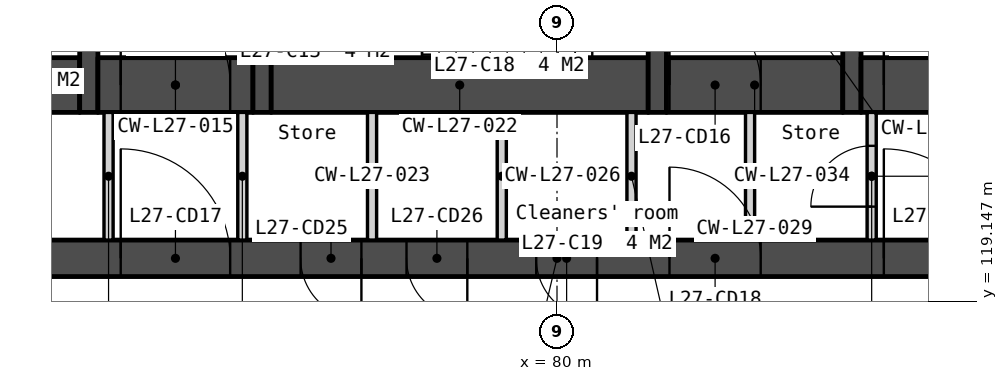
"""IFC4 building model, lengths in metres.
Left out: names, types, materials, properties, quantities, classifications, styles, units other than length and angle.
Written with IfcOpenShell. Run it as: python <this file> out.ifc"""

import sys

from ifc_helpers import new_model, si_unit, direction, frame, frame_2d, origin, place, context, subcontext, project, spatial, polyline, rectangle, outline, extrude, element, fill, save


model = new_model("IFC4")
c1 = context("Model", 3, precision=1e-05, world=origin(), true_north=direction((0.0, 1.0)))
c2 = subcontext(c1, "Body", "Model", "MODEL_VIEW")
j1 = project(units=[si_unit("LENGTHUNIT", "METRE"), si_unit("PLANEANGLEUNIT", "RADIAN")], contexts=[c1])
p1 = place(None, origin())
s1 = spatial("IfcSite", under=j1, at=p1, CompositionType="ELEMENT")
p2 = place(p1, origin())
s2 = spatial("IfcBuilding", under=s1, at=p2, CompositionType="ELEMENT")
p3 = place(p2, frame((0.0, 0.0, 109.8)))
s3 = spatial("IfcBuildingStorey", under=s2, at=p3, CompositionType="ELEMENT", Elevation=109.8)
p4 = place(p3, frame((66.0, 119.85, 0.0), z_axis=(0.0, 0.0, 1.0), x_axis=(1.0, 0.0, 0.0)))
e1 = element("IfcWall", 1, at=p4, inside=s3, PredefinedType="SOLIDWALL", context=c2, shape_type="SweptSolid", body=[
    extrude(rectangle(XDim=28.0, YDim=0.6, at=frame_2d((14.0, 0.0))), origin(), (0.0, 0.0, 1.0), 3.35),
])
p5 = place(p4, frame((6.825, 0.0, 0.0)))
e2 = element("IfcOpeningElement", 2, at=p5, cuts=e1, PredefinedType="OPENING", context=c2, shape_type="SweptSolid", body=[
    extrude(rectangle(XDim=1.8, YDim=2.1, at=frame_2d((0.9, 1.05))), frame((0.0, 0.31, 0.0), z_axis=(0.0, -1.0, 0.0), x_axis=(1.0, 0.0, 0.0)), (0.0, 0.0, 1.0), 0.62),
])
p6 = place(p4, frame((15.85, 0.0, 0.0)))
e3 = element("IfcOpeningElement", 3, at=p6, cuts=e1, PredefinedType="OPENING", context=c2, shape_type="SweptSolid", body=[
    extrude(rectangle(XDim=1.5, YDim=2.1, at=frame_2d((0.75, 1.05))), frame((0.0, 0.31, 0.0), z_axis=(0.0, -1.0, 0.0), x_axis=(1.0, 0.0, 0.0)), (0.0, 0.0, 1.0), 0.62),
])
p7 = place(p4, frame((19.375, 0.0, 0.0)))
e4 = element("IfcOpeningElement", 4, at=p7, cuts=e1, PredefinedType="OPENING", context=c2, shape_type="SweptSolid", body=[
    extrude(rectangle(XDim=1.8, YDim=2.1, at=frame_2d((0.9, 1.05))), frame((0.0, 0.31, 0.0), z_axis=(0.0, -1.0, 0.0), x_axis=(1.0, 0.0, 0.0)), (0.0, 0.0, 1.0), 0.62),
])
p8 = place(p4, frame((4.425, 0.0, 0.0)))
e5 = element("IfcOpeningElement", 5, at=p8, cuts=e1, PredefinedType="OPENING", context=c2, shape_type="SweptSolid", body=[
    extrude(rectangle(XDim=1.0, YDim=2.1, at=frame_2d((0.5, 1.05))), frame((0.0, 0.31, 0.0), z_axis=(0.0, -1.0, 0.0), x_axis=(1.0, 0.0, 0.0)), (0.0, 0.0, 1.0), 0.62),
])
p9 = place(p4, frame((9.783, 0.0, 0.0)))
e6 = element("IfcOpeningElement", 6, at=p9, cuts=e1, PredefinedType="OPENING", context=c2, shape_type="SweptSolid", body=[
    extrude(rectangle(XDim=1.0, YDim=2.1, at=frame_2d((0.5, 1.05))), frame((0.0, 0.31, 0.0), z_axis=(0.0, -1.0, 0.0), x_axis=(1.0, 0.0, 0.0)), (0.0, 0.0, 1.0), 0.62),
])
p10 = place(p4, frame((11.525, 0.0, 0.0)))
e7 = element("IfcOpeningElement", 7, at=p10, cuts=e1, PredefinedType="OPENING", context=c2, shape_type="SweptSolid", body=[
    extrude(rectangle(XDim=1.0, YDim=2.1, at=frame_2d((0.5, 1.05))), frame((0.0, 0.31, 0.0), z_axis=(0.0, -1.0, 0.0), x_axis=(1.0, 0.0, 0.0)), (0.0, 0.0, 1.0), 0.62),
])
p11 = place(p4, frame((13.658, 0.0, 0.0)))
e8 = element("IfcOpeningElement", 8, at=p11, cuts=e1, PredefinedType="OPENING", context=c2, shape_type="SweptSolid", body=[
    extrude(rectangle(XDim=1.0, YDim=2.1, at=frame_2d((0.5, 1.05))), frame((0.0, 0.31, 0.0), z_axis=(0.0, -1.0, 0.0), x_axis=(1.0, 0.0, 0.0)), (0.0, 0.0, 1.0), 0.62),
])
p12 = place(p4, frame((22.575, 0.0, 0.0)))
e9 = element("IfcOpeningElement", 9, at=p12, cuts=e1, PredefinedType="OPENING", context=c2, shape_type="SweptSolid", body=[
    extrude(rectangle(XDim=1.0, YDim=2.1, at=frame_2d((0.5, 1.05))), frame((0.0, 0.31, 0.0), z_axis=(0.0, -1.0, 0.0), x_axis=(1.0, 0.0, 0.0)), (0.0, 0.0, 1.0), 0.62),
])
p13 = place(p3, frame((69.6, 122.7, 0.0), z_axis=(0.0, 0.0, 1.0), x_axis=(1.0, 0.0, 0.0)))
e10 = element("IfcWall", 10, at=p13, inside=s3, PredefinedType="SOLIDWALL", context=c2, shape_type="SweptSolid", body=[
    extrude(rectangle(XDim=2.55, YDim=0.9, at=frame_2d((1.275, 0.0))), origin(), (0.0, 0.0, 1.0), 3.35),
])
p14 = place(p3, frame((72.3, 133.95, 0.0), z_axis=(0.0, 0.0, 1.0), x_axis=(0.0, -1.0, 0.0)))
e11 = element("IfcWall", 11, at=p14, inside=s3, PredefinedType="SOLIDWALL", context=c2, shape_type="SweptSolid", body=[
    extrude(rectangle(XDim=11.7, YDim=0.3, at=frame_2d((5.85, 0.0))), origin(), (0.0, 0.0, 1.0), 3.35),
])
p15 = place(p14, frame((6.95, 0.0, 0.0)))
e12 = element("IfcOpeningElement", 12, at=p15, cuts=e11, PredefinedType="OPENING", context=c2, shape_type="SweptSolid", body=[
    extrude(rectangle(XDim=1.1, YDim=2.1, at=frame_2d((0.55, 1.05))), frame((0.0, 0.16, 0.0), z_axis=(0.0, -1.0, 0.0), x_axis=(1.0, 0.0, 0.0)), (0.0, 0.0, 1.0), 0.32),
])
p16 = place(p14, frame((9.35, 0.0, 0.0)))
e13 = element("IfcOpeningElement", 13, at=p16, cuts=e11, PredefinedType="OPENING", context=c2, shape_type="SweptSolid", body=[
    extrude(rectangle(XDim=0.9, YDim=2.1, at=frame_2d((0.45, 1.05))), frame((0.0, 0.16, 0.0), z_axis=(0.0, -1.0, 0.0), x_axis=(1.0, 0.0, 0.0)), (0.0, 0.0, 1.0), 0.32),
])
p17 = place(p14, frame((5.1, 0.0, 0.0)))
e14 = element("IfcOpeningElement", 14, at=p17, cuts=e11, PredefinedType="OPENING", context=c2, shape_type="SweptSolid", body=[
    extrude(rectangle(XDim=1.0, YDim=2.1, at=frame_2d((0.5, 1.05))), frame((0.0, 0.16, 0.0), z_axis=(0.0, -1.0, 0.0), x_axis=(1.0, 0.0, 0.0)), (0.0, 0.0, 1.0), 0.32),
])
p18 = place(p3, frame((72.45, 122.7, 0.0), z_axis=(0.0, 0.0, 1.0), x_axis=(1.0, 0.0, 0.0)))
e15 = element("IfcWall", 15, at=p18, inside=s3, PredefinedType="SOLIDWALL", context=c2, shape_type="SweptSolid", body=[
    extrude(rectangle(XDim=2.55, YDim=0.9, at=frame_2d((1.275, 0.0))), origin(), (0.0, 0.0, 1.0), 3.35),
])
p19 = place(p18, frame((0.375, 0.0, 0.0)))
e16 = element("IfcOpeningElement", 16, at=p19, cuts=e15, PredefinedType="OPENING", context=c2, shape_type="SweptSolid", body=[
    extrude(rectangle(XDim=1.8, YDim=2.1, at=frame_2d((0.9, 1.05))), frame((0.0, 0.46, 0.0), z_axis=(0.0, -1.0, 0.0), x_axis=(1.0, 0.0, 0.0)), (0.0, 0.0, 1.0), 0.92),
])
for number, where, z_axis, x_axis in (
    (17, (72.625, 122.25, 0.0), (0.0, 0.0, 1.0), (0.0, -1.0, 0.0)),
    (18, (74.825, 122.25, 0.0), (0.0, 0.0, 1.0), (0.0, -1.0, 0.0)),
):
    element("IfcWall", number, at=place(p3, frame(where, z_axis=z_axis, x_axis=x_axis)), inside=s3, PredefinedType="PARTITIONING", context=c2, shape_type="SweptSolid", body=[
        extrude(rectangle(XDim=2.1, YDim=0.15, at=frame_2d((1.05, 0.0))), origin(), (0.0, 0.0, 1.0), 3.35),
    ])
p20 = place(p3, frame((75.15, 133.95, 0.0), z_axis=(0.0, 0.0, 1.0), x_axis=(0.0, -1.0, 0.0)))
e19 = element("IfcWall", 19, at=p20, inside=s3, PredefinedType="SOLIDWALL", context=c2, shape_type="SweptSolid", body=[
    extrude(rectangle(XDim=11.7, YDim=0.3, at=frame_2d((5.85, 0.0))), origin(), (0.0, 0.0, 1.0), 3.35),
])
p21 = place(p3, frame((75.3, 122.7, 0.0), z_axis=(0.0, 0.0, 1.0), x_axis=(1.0, 0.0, 0.0)))
e20 = element("IfcWall", 20, at=p21, inside=s3, PredefinedType="SOLIDWALL", context=c2, shape_type="SweptSolid", body=[
    extrude(rectangle(XDim=6.2, YDim=0.9, at=frame_2d((3.1, 0.0))), origin(), (0.0, 0.0, 1.0), 3.35),
])
for number, where, z_axis, x_axis in (
    (21, (76.958, 122.25, 0.0), (0.0, 0.0, 1.0), (0.0, -1.0, 0.0)),
    (22, (79.092, 122.25, 0.0), (0.0, 0.0, 1.0), (0.0, -1.0, 0.0)),
    (23, (81.225, 122.25, 0.0), (0.0, 0.0, 1.0), (0.0, -1.0, 0.0)),
):
    element("IfcWall", number, at=place(p3, frame(where, z_axis=z_axis, x_axis=x_axis)), inside=s3, PredefinedType="PARTITIONING", context=c2, shape_type="SweptSolid", body=[
        extrude(rectangle(XDim=2.1, YDim=0.15, at=frame_2d((1.05, 0.0))), origin(), (0.0, 0.0, 1.0), 3.35),
    ])
p22 = place(p3, frame((81.65, 125.7, 0.0), z_axis=(0.0, 0.0, 1.0), x_axis=(0.0, -1.0, 0.0)))
e24 = element("IfcWall", 24, at=p22, inside=s3, PredefinedType="SOLIDWALL", context=c2, shape_type="SweptSolid", body=[
    extrude(rectangle(XDim=3.45, YDim=0.3, at=frame_2d((1.725, 0.0))), origin(), (0.0, 0.0, 1.0), 3.35),
])
p23 = place(p22, frame((0.75, 0.0, 0.0)))
e25 = element("IfcOpeningElement", 25, at=p23, cuts=e24, PredefinedType="OPENING", context=c2, shape_type="SweptSolid", body=[
    extrude(rectangle(XDim=1.0, YDim=2.1, at=frame_2d((0.5, 1.05))), frame((0.0, 0.16, 0.0), z_axis=(0.0, -1.0, 0.0), x_axis=(1.0, 0.0, 0.0)), (0.0, 0.0, 1.0), 0.32),
])
p24 = place(p3, frame((81.8, 122.7, 0.0), z_axis=(0.0, 0.0, 1.0), x_axis=(1.0, 0.0, 0.0)))
e26 = element("IfcWall", 26, at=p24, inside=s3, PredefinedType="SOLIDWALL", context=c2, shape_type="SweptSolid", body=[
    extrude(rectangle(XDim=2.9, YDim=0.9, at=frame_2d((1.45, 0.0))), origin(), (0.0, 0.0, 1.0), 3.35),
])
p25 = place(p24, frame((0.05, 0.0, 0.0)))
e27 = element("IfcOpeningElement", 27, at=p25, cuts=e26, PredefinedType="OPENING", context=c2, shape_type="SweptSolid", body=[
    extrude(rectangle(XDim=1.5, YDim=2.1, at=frame_2d((0.75, 1.05))), frame((0.0, 0.46, 0.0), z_axis=(0.0, -1.0, 0.0), x_axis=(1.0, 0.0, 0.0)), (0.0, 0.0, 1.0), 0.92),
])
p26 = place(p3, frame((83.175, 122.25, 0.0), z_axis=(0.0, 0.0, 1.0), x_axis=(0.0, -1.0, 0.0)))
e28 = element("IfcWall", 28, at=p26, inside=s3, PredefinedType="PARTITIONING", context=c2, shape_type="SweptSolid", body=[
    extrude(rectangle(XDim=2.1, YDim=0.15, at=frame_2d((1.05, 0.0))), origin(), (0.0, 0.0, 1.0), 3.35),
])
p27 = place(p3, frame((84.85, 133.95, 0.0), z_axis=(0.0, 0.0, 1.0), x_axis=(0.0, -1.0, 0.0)))
e29 = element("IfcWall", 29, at=p27, inside=s3, PredefinedType="SOLIDWALL", context=c2, shape_type="SweptSolid", body=[
    extrude(rectangle(XDim=11.7, YDim=0.3, at=frame_2d((5.85, 0.0))), origin(), (0.0, 0.0, 1.0), 3.35),
])
p28 = place(p3, frame((85.0, 122.7, 0.0), z_axis=(0.0, 0.0, 1.0), x_axis=(1.0, 0.0, 0.0)))
e30 = element("IfcWall", 30, at=p28, inside=s3, PredefinedType="SOLIDWALL", context=c2, shape_type="SweptSolid", body=[
    extrude(rectangle(XDim=2.55, YDim=0.9, at=frame_2d((1.275, 0.0))), origin(), (0.0, 0.0, 1.0), 3.35),
])
p29 = place(p28, frame((0.375, 0.0, 0.0)))
e31 = element("IfcOpeningElement", 31, at=p29, cuts=e30, PredefinedType="OPENING", context=c2, shape_type="SweptSolid", body=[
    extrude(rectangle(XDim=1.8, YDim=2.1, at=frame_2d((0.9, 1.05))), frame((0.0, 0.46, 0.0), z_axis=(0.0, -1.0, 0.0), x_axis=(1.0, 0.0, 0.0)), (0.0, 0.0, 1.0), 0.92),
])
p30 = place(p3, frame((85.175, 122.25, 0.0), z_axis=(0.0, 0.0, 1.0), x_axis=(0.0, -1.0, 0.0)))
e32 = element("IfcWall", 32, at=p30, inside=s3, PredefinedType="PARTITIONING", context=c2, shape_type="SweptSolid", body=[
    extrude(rectangle(XDim=2.1, YDim=0.15, at=frame_2d((1.05, 0.0))), origin(), (0.0, 0.0, 1.0), 3.35),
])
p31 = place(p30, frame((0.55, 0.0, 0.0)))
e33 = element("IfcOpeningElement", 33, at=p31, cuts=e32, PredefinedType="OPENING", context=c2, shape_type="SweptSolid", body=[
    extrude(rectangle(XDim=1.0, YDim=2.1, at=frame_2d((0.5, 1.05))), frame((0.0, 0.085, 0.0), z_axis=(0.0, -1.0, 0.0), x_axis=(1.0, 0.0, 0.0)), (0.0, 0.0, 1.0), 0.17),
])
p32 = place(p3, frame((56.073, 130.263, -0.15), z_axis=(0.0, 0.0, 1.0), x_axis=(0.500000478905, -0.866025127289, 0.0)))
e34 = element("IfcWall", 34, at=p32, inside=s3, PredefinedType="SOLIDWALL", context=c2, shape_type="SweptSolid", body=[
    extrude(outline(polyline([(42.643, 0.0), (42.643, 3.5), (0.0, 3.5), (0.0, 0.0), (42.643, 0.0)])), frame((0.0, 0.225, 0.0), z_axis=(0.0, -1.0, 0.0), x_axis=(1.0, 0.0, 0.0)), (0.0, 0.0, 1.0), 0.45),
])
p33 = place(p32, frame((2.814, 0.0, 1.05)))
e35 = element("IfcOpeningElement", 35, at=p33, cuts=e34, PredefinedType="OPENING", context=c2, shape_type="SweptSolid", body=[
    extrude(rectangle(XDim=1.2, YDim=1.5, at=frame_2d((0.6, 0.75))), frame((0.0, 0.235, 0.0), z_axis=(0.0, -1.0, 0.0), x_axis=(1.0, 0.0, 0.0)), (0.0, 0.0, 1.0), 0.47),
])
p34 = place(p32, frame((4.514, 0.0, 1.05)))
e36 = element("IfcOpeningElement", 36, at=p34, cuts=e34, PredefinedType="OPENING", context=c2, shape_type="SweptSolid", body=[
    extrude(rectangle(XDim=1.2, YDim=1.5, at=frame_2d((0.6, 0.75))), frame((0.0, 0.235, 0.0), z_axis=(0.0, -1.0, 0.0), x_axis=(1.0, 0.0, 0.0)), (0.0, 0.0, 1.0), 0.47),
])
p35 = place(p32, frame((11.343, 0.0, 1.05)))
e37 = element("IfcOpeningElement", 37, at=p35, cuts=e34, PredefinedType="OPENING", context=c2, shape_type="SweptSolid", body=[
    extrude(rectangle(XDim=1.2, YDim=1.5, at=frame_2d((0.6, 0.75))), frame((0.0, 0.235, 0.0), z_axis=(0.0, -1.0, 0.0), x_axis=(1.0, 0.0, 0.0)), (0.0, 0.0, 1.0), 0.47),
])
p36 = place(p32, frame((13.043, 0.0, 1.05)))
e38 = element("IfcOpeningElement", 38, at=p36, cuts=e34, PredefinedType="OPENING", context=c2, shape_type="SweptSolid", body=[
    extrude(rectangle(XDim=1.2, YDim=1.5, at=frame_2d((0.6, 0.75))), frame((0.0, 0.235, 0.0), z_axis=(0.0, -1.0, 0.0), x_axis=(1.0, 0.0, 0.0)), (0.0, 0.0, 1.0), 0.47),
])
p37 = place(p32, frame((19.872, 0.0, 1.05)))
e39 = element("IfcOpeningElement", 39, at=p37, cuts=e34, PredefinedType="OPENING", context=c2, shape_type="SweptSolid", body=[
    extrude(rectangle(XDim=1.2, YDim=1.5, at=frame_2d((0.6, 0.75))), frame((0.0, 0.235, 0.0), z_axis=(0.0, -1.0, 0.0), x_axis=(1.0, 0.0, 0.0)), (0.0, 0.0, 1.0), 0.47),
])
p38 = place(p32, frame((21.572, 0.0, 1.05)))
e40 = element("IfcOpeningElement", 40, at=p38, cuts=e34, PredefinedType="OPENING", context=c2, shape_type="SweptSolid", body=[
    extrude(rectangle(XDim=1.2, YDim=1.5, at=frame_2d((0.6, 0.75))), frame((0.0, 0.235, 0.0), z_axis=(0.0, -1.0, 0.0), x_axis=(1.0, 0.0, 0.0)), (0.0, 0.0, 1.0), 0.47),
])
p39 = place(p32, frame((28.4, 0.0, 1.05)))
e41 = element("IfcOpeningElement", 41, at=p39, cuts=e34, PredefinedType="OPENING", context=c2, shape_type="SweptSolid", body=[
    extrude(rectangle(XDim=1.2, YDim=1.5, at=frame_2d((0.6, 0.75))), frame((0.0, 0.235, 0.0), z_axis=(0.0, -1.0, 0.0), x_axis=(1.0, 0.0, 0.0)), (0.0, 0.0, 1.0), 0.47),
])
p40 = place(p32, frame((30.1, 0.0, 1.05)))
e42 = element("IfcOpeningElement", 42, at=p40, cuts=e34, PredefinedType="OPENING", context=c2, shape_type="SweptSolid", body=[
    extrude(rectangle(XDim=1.2, YDim=1.5, at=frame_2d((0.6, 0.75))), frame((0.0, 0.235, 0.0), z_axis=(0.0, -1.0, 0.0), x_axis=(1.0, 0.0, 0.0)), (0.0, 0.0, 1.0), 0.47),
])
p41 = place(p32, frame((36.929, 0.0, 1.05)))
e43 = element("IfcOpeningElement", 43, at=p41, cuts=e34, PredefinedType="OPENING", context=c2, shape_type="SweptSolid", body=[
    extrude(rectangle(XDim=1.2, YDim=1.5, at=frame_2d((0.6, 0.75))), frame((0.0, 0.235, 0.0), z_axis=(0.0, -1.0, 0.0), x_axis=(1.0, 0.0, 0.0)), (0.0, 0.0, 1.0), 0.47),
])
p42 = place(p32, frame((38.629, 0.0, 1.05)))
e44 = element("IfcOpeningElement", 44, at=p42, cuts=e34, PredefinedType="OPENING", context=c2, shape_type="SweptSolid", body=[
    extrude(rectangle(XDim=1.2, YDim=1.5, at=frame_2d((0.6, 0.75))), frame((0.0, 0.235, 0.0), z_axis=(0.0, -1.0, 0.0), x_axis=(1.0, 0.0, 0.0)), (0.0, 0.0, 1.0), 0.47),
])
p43 = place(p3, frame((82.605, 93.333, -0.15), z_axis=(0.0, 0.0, 1.0), x_axis=(0.500000478905, 0.866025127289, 0.0)))
e45 = element("IfcWall", 45, at=p43, inside=s3, PredefinedType="SOLIDWALL", context=c2, shape_type="SweptSolid", body=[
    extrude(outline(polyline([(42.643, 0.0), (42.643, 3.5), (0.0, 3.5), (0.0, 0.0), (42.643, 0.0)])), frame((0.0, 0.225, 0.0), z_axis=(0.0, -1.0, 0.0), x_axis=(1.0, 0.0, 0.0)), (0.0, 0.0, 1.0), 0.45),
])
p44 = place(p43, frame((2.814, 0.0, 1.05)))
e46 = element("IfcOpeningElement", 46, at=p44, cuts=e45, PredefinedType="OPENING", context=c2, shape_type="SweptSolid", body=[
    extrude(rectangle(XDim=1.2, YDim=1.5, at=frame_2d((0.6, 0.75))), frame((0.0, 0.235, 0.0), z_axis=(0.0, -1.0, 0.0), x_axis=(1.0, 0.0, 0.0)), (0.0, 0.0, 1.0), 0.47),
])
p45 = place(p43, frame((4.514, 0.0, 1.05)))
e47 = element("IfcOpeningElement", 47, at=p45, cuts=e45, PredefinedType="OPENING", context=c2, shape_type="SweptSolid", body=[
    extrude(rectangle(XDim=1.2, YDim=1.5, at=frame_2d((0.6, 0.75))), frame((0.0, 0.235, 0.0), z_axis=(0.0, -1.0, 0.0), x_axis=(1.0, 0.0, 0.0)), (0.0, 0.0, 1.0), 0.47),
])
p46 = place(p43, frame((11.343, 0.0, 1.05)))
e48 = element("IfcOpeningElement", 48, at=p46, cuts=e45, PredefinedType="OPENING", context=c2, shape_type="SweptSolid", body=[
    extrude(rectangle(XDim=1.2, YDim=1.5, at=frame_2d((0.6, 0.75))), frame((0.0, 0.235, 0.0), z_axis=(0.0, -1.0, 0.0), x_axis=(1.0, 0.0, 0.0)), (0.0, 0.0, 1.0), 0.47),
])
p47 = place(p43, frame((13.043, 0.0, 1.05)))
e49 = element("IfcOpeningElement", 49, at=p47, cuts=e45, PredefinedType="OPENING", context=c2, shape_type="SweptSolid", body=[
    extrude(rectangle(XDim=1.2, YDim=1.5, at=frame_2d((0.6, 0.75))), frame((0.0, 0.235, 0.0), z_axis=(0.0, -1.0, 0.0), x_axis=(1.0, 0.0, 0.0)), (0.0, 0.0, 1.0), 0.47),
])
p48 = place(p43, frame((19.872, 0.0, 1.05)))
e50 = element("IfcOpeningElement", 50, at=p48, cuts=e45, PredefinedType="OPENING", context=c2, shape_type="SweptSolid", body=[
    extrude(rectangle(XDim=1.2, YDim=1.5, at=frame_2d((0.6, 0.75))), frame((0.0, 0.235, 0.0), z_axis=(0.0, -1.0, 0.0), x_axis=(1.0, 0.0, 0.0)), (0.0, 0.0, 1.0), 0.47),
])
p49 = place(p43, frame((21.572, 0.0, 1.05)))
e51 = element("IfcOpeningElement", 51, at=p49, cuts=e45, PredefinedType="OPENING", context=c2, shape_type="SweptSolid", body=[
    extrude(rectangle(XDim=1.2, YDim=1.5, at=frame_2d((0.6, 0.75))), frame((0.0, 0.235, 0.0), z_axis=(0.0, -1.0, 0.0), x_axis=(1.0, 0.0, 0.0)), (0.0, 0.0, 1.0), 0.47),
])
p50 = place(p43, frame((28.4, 0.0, 1.05)))
e52 = element("IfcOpeningElement", 52, at=p50, cuts=e45, PredefinedType="OPENING", context=c2, shape_type="SweptSolid", body=[
    extrude(rectangle(XDim=1.2, YDim=1.5, at=frame_2d((0.6, 0.75))), frame((0.0, 0.235, 0.0), z_axis=(0.0, -1.0, 0.0), x_axis=(1.0, 0.0, 0.0)), (0.0, 0.0, 1.0), 0.47),
])
p51 = place(p43, frame((30.1, 0.0, 1.05)))
e53 = element("IfcOpeningElement", 53, at=p51, cuts=e45, PredefinedType="OPENING", context=c2, shape_type="SweptSolid", body=[
    extrude(rectangle(XDim=1.2, YDim=1.5, at=frame_2d((0.6, 0.75))), frame((0.0, 0.235, 0.0), z_axis=(0.0, -1.0, 0.0), x_axis=(1.0, 0.0, 0.0)), (0.0, 0.0, 1.0), 0.47),
])
p52 = place(p43, frame((36.929, 0.0, 1.05)))
e54 = element("IfcOpeningElement", 54, at=p52, cuts=e45, PredefinedType="OPENING", context=c2, shape_type="SweptSolid", body=[
    extrude(rectangle(XDim=1.2, YDim=1.5, at=frame_2d((0.6, 0.75))), frame((0.0, 0.235, 0.0), z_axis=(0.0, -1.0, 0.0), x_axis=(1.0, 0.0, 0.0)), (0.0, 0.0, 1.0), 0.47),
])
p53 = place(p43, frame((38.629, 0.0, 1.05)))
e55 = element("IfcOpeningElement", 55, at=p53, cuts=e45, PredefinedType="OPENING", context=c2, shape_type="SweptSolid", body=[
    extrude(rectangle(XDim=1.2, YDim=1.5, at=frame_2d((0.6, 0.75))), frame((0.0, 0.235, 0.0), z_axis=(0.0, -1.0, 0.0), x_axis=(1.0, 0.0, 0.0)), (0.0, 0.0, 1.0), 0.47),
])
p54 = place(p29, origin())
e56 = element("IfcDoor", 56, at=p54, inside=s3, OperationType="DOUBLE_DOOR_DOUBLE_SWING", PredefinedType="DOOR", context=c2, shape_type="SweptSolid", body=[
    extrude(rectangle(XDim=1.8, YDim=2.1, at=frame_2d((0.9, 1.05))), frame((0.0, 0.025, 0.0), z_axis=(0.0, -1.0, 0.0), x_axis=(1.0, 0.0, 0.0)), (0.0, 0.0, 1.0), 0.05),
])
fill(e31, e56)
p55 = place(p19, origin())
e57 = element("IfcDoor", 57, at=p55, inside=s3, OperationType="DOUBLE_DOOR_DOUBLE_SWING", PredefinedType="DOOR", context=c2, shape_type="SweptSolid", body=[
    extrude(rectangle(XDim=1.8, YDim=2.1, at=frame_2d((0.9, 1.05))), frame((0.0, 0.025, 0.0), z_axis=(0.0, -1.0, 0.0), x_axis=(1.0, 0.0, 0.0)), (0.0, 0.0, 1.0), 0.05),
])
fill(e16, e57)
p56 = place(p25, origin())
e58 = element("IfcDoor", 58, at=p56, inside=s3, OperationType="DOUBLE_DOOR_DOUBLE_SWING", PredefinedType="DOOR", context=c2, shape_type="SweptSolid", body=[
    extrude(rectangle(XDim=1.5, YDim=2.1, at=frame_2d((0.75, 1.05))), frame((0.0, 0.025, 0.0), z_axis=(0.0, -1.0, 0.0), x_axis=(1.0, 0.0, 0.0)), (0.0, 0.0, 1.0), 0.05),
])
fill(e27, e58)
p57 = place(p5, origin())
e59 = element("IfcDoor", 59, at=p57, inside=s3, OperationType="DOUBLE_DOOR_DOUBLE_SWING", PredefinedType="DOOR", context=c2, shape_type="SweptSolid", body=[
    extrude(rectangle(XDim=1.8, YDim=2.1, at=frame_2d((0.9, 1.05))), frame((0.0, 0.025, 0.0), z_axis=(0.0, -1.0, 0.0), x_axis=(1.0, 0.0, 0.0)), (0.0, 0.0, 1.0), 0.05),
])
fill(e2, e59)
p58 = place(p6, origin())
e60 = element("IfcDoor", 60, at=p58, inside=s3, OperationType="DOUBLE_DOOR_DOUBLE_SWING", PredefinedType="DOOR", context=c2, shape_type="SweptSolid", body=[
    extrude(rectangle(XDim=1.5, YDim=2.1, at=frame_2d((0.75, 1.05))), frame((0.0, 0.025, 0.0), z_axis=(0.0, -1.0, 0.0), x_axis=(1.0, 0.0, 0.0)), (0.0, 0.0, 1.0), 0.05),
])
fill(e3, e60)
p59 = place(p7, origin())
e61 = element("IfcDoor", 61, at=p59, inside=s3, OperationType="DOUBLE_DOOR_DOUBLE_SWING", PredefinedType="DOOR", context=c2, shape_type="SweptSolid", body=[
    extrude(rectangle(XDim=1.8, YDim=2.1, at=frame_2d((0.9, 1.05))), frame((0.0, 0.025, 0.0), z_axis=(0.0, -1.0, 0.0), x_axis=(1.0, 0.0, 0.0)), (0.0, 0.0, 1.0), 0.05),
])
fill(e4, e61)
p60 = place(p9, origin())
e62 = element("IfcDoor", 62, at=p60, inside=s3, OperationType="SINGLE_SWING_RIGHT", PredefinedType="DOOR", context=c2, shape_type="SweptSolid", body=[
    extrude(rectangle(XDim=1.0, YDim=2.1, at=frame_2d((0.5, 1.05))), frame((0.0, 0.025, 0.0), z_axis=(0.0, -1.0, 0.0), x_axis=(1.0, 0.0, 0.0)), (0.0, 0.0, 1.0), 0.05),
])
fill(e6, e62)
p61 = place(p10, origin())
e63 = element("IfcDoor", 63, at=p61, inside=s3, OperationType="SINGLE_SWING_RIGHT", PredefinedType="DOOR", context=c2, shape_type="SweptSolid", body=[
    extrude(rectangle(XDim=1.0, YDim=2.1, at=frame_2d((0.5, 1.05))), frame((0.0, 0.025, 0.0), z_axis=(0.0, -1.0, 0.0), x_axis=(1.0, 0.0, 0.0)), (0.0, 0.0, 1.0), 0.05),
])
fill(e7, e63)
p62 = place(p11, origin())
e64 = element("IfcDoor", 64, at=p62, inside=s3, OperationType="SINGLE_SWING_RIGHT", PredefinedType="DOOR", context=c2, shape_type="SweptSolid", body=[
    extrude(rectangle(XDim=1.0, YDim=2.1, at=frame_2d((0.5, 1.05))), frame((0.0, 0.025, 0.0), z_axis=(0.0, -1.0, 0.0), x_axis=(1.0, 0.0, 0.0)), (0.0, 0.0, 1.0), 0.05),
])
fill(e8, e64)
p63 = place(p31, origin())
e65 = element("IfcDoor", 65, at=p63, inside=s3, OperationType="SINGLE_SWING_RIGHT", PredefinedType="DOOR", context=c2, shape_type="SweptSolid", body=[
    extrude(rectangle(XDim=1.0, YDim=2.1, at=frame_2d((0.5, 1.05))), frame((0.0, 0.025, 0.0), z_axis=(0.0, -1.0, 0.0), x_axis=(1.0, 0.0, 0.0)), (0.0, 0.0, 1.0), 0.05),
])
fill(e33, e65)
save(model, sys.argv[1])
